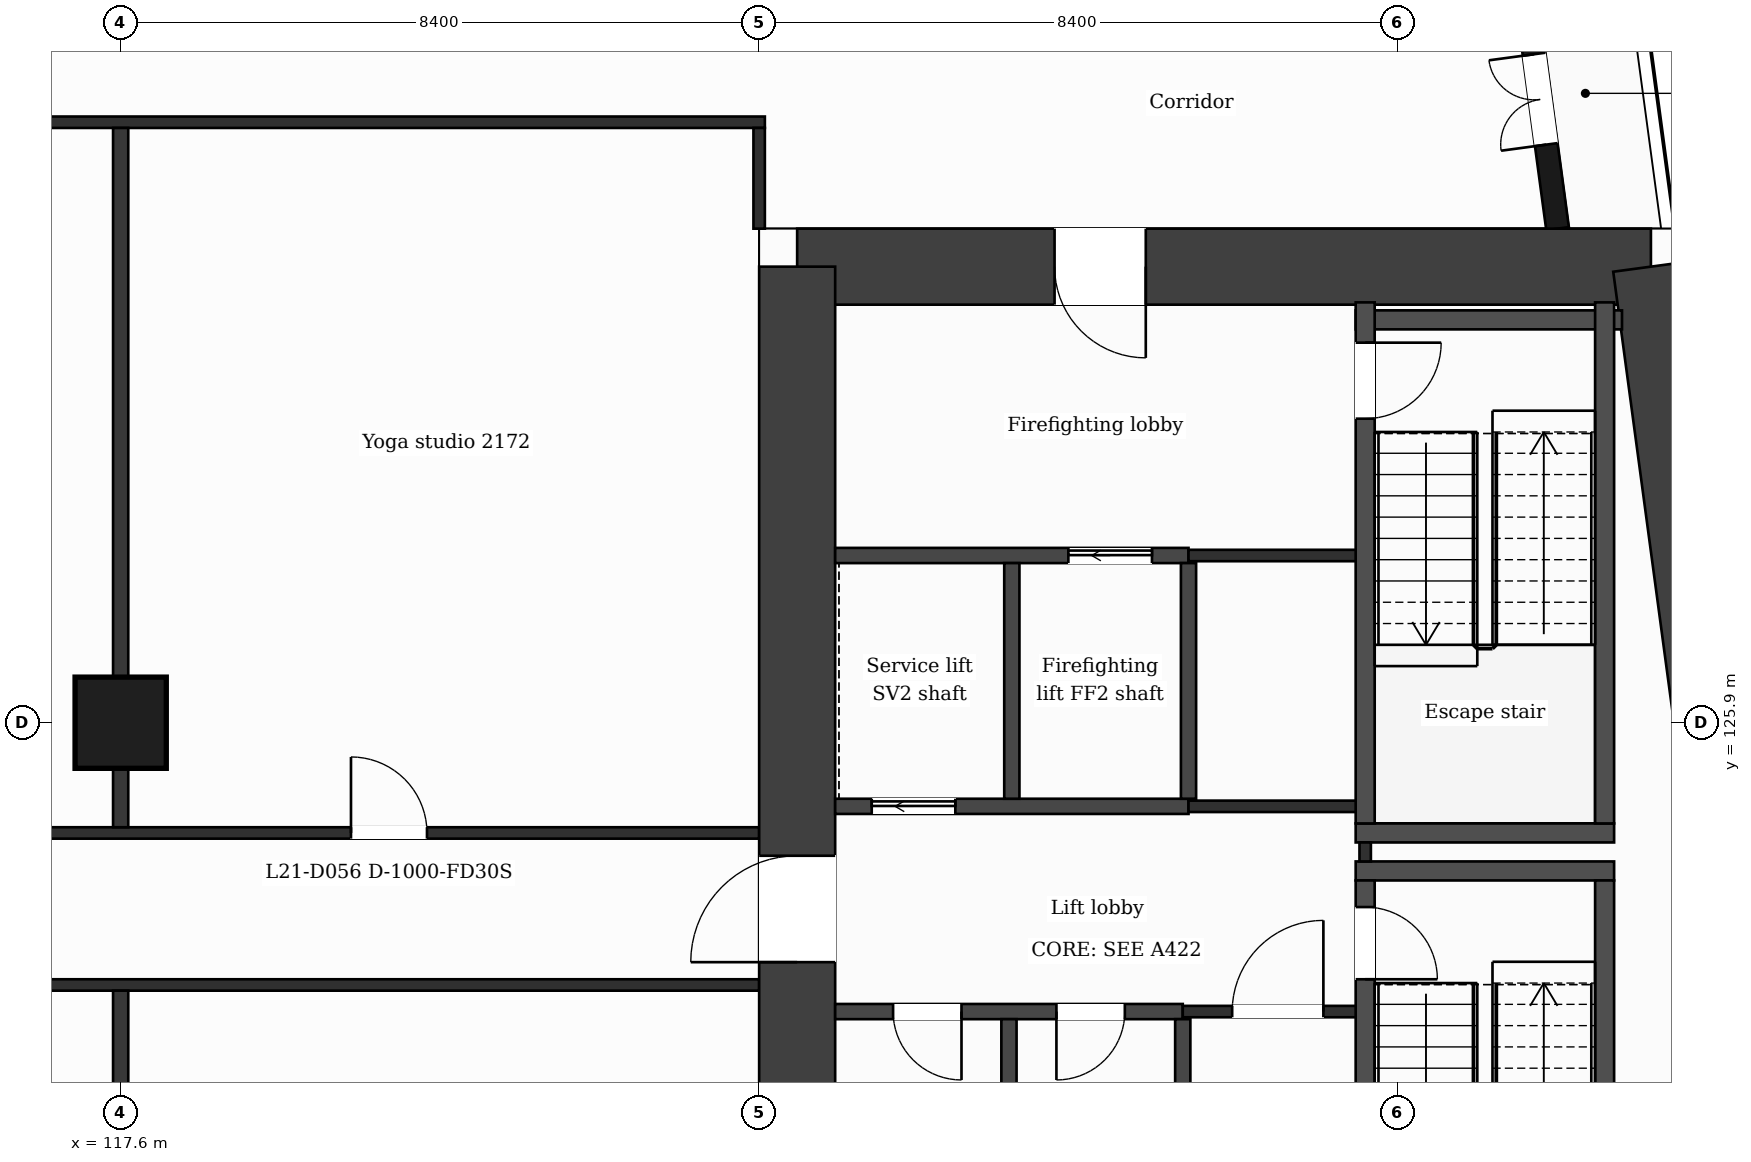
"""IFC4 building model, lengths in metres.
Left out: names, types, materials, properties, quantities, classifications, styles, units other than length and angle.
Written with IfcOpenShell. Run it as: python <this file> out.ifc"""

import sys

from ifc_helpers import new_model, si_unit, direction, frame, frame_2d, origin, origin_2d, place, context, subcontext, project, spatial, rectangle, extrude, element, fill, save


model = new_model("IFC4")
c1 = context("Model", 3, precision=1e-05, world=origin(), true_north=direction((0.0, 1.0)))
c2 = subcontext(c1, "Body", "Model", "MODEL_VIEW")
j1 = project(units=[si_unit("LENGTHUNIT", "METRE"), si_unit("PLANEANGLEUNIT", "RADIAN")], contexts=[c1])
p1 = place(None, origin())
s1 = spatial("IfcSite", under=j1, at=p1, CompositionType="ELEMENT")
p2 = place(p1, origin())
s2 = spatial("IfcBuilding", under=s1, at=p2, CompositionType="ELEMENT")
p3 = place(p2, frame((0.0, 0.0, 94.7)))
s3 = spatial("IfcBuildingStorey", under=s2, at=p3, CompositionType="ELEMENT", Elevation=94.7)
p4 = place(p3, frame((126.5, 131.9, 0.0), z_axis=(0.0, 0.0, 1.0), x_axis=(1.0, 0.0, 0.0)))
e1 = element("IfcWall", 1, at=p4, inside=s3, PredefinedType="SHEAR", context=c2, shape_type="SweptSolid", body=[
    extrude(rectangle(XDim=11.232, YDim=1.0, at=frame_2d((5.616, 0.0))), origin(), (0.0, 0.0, 1.0), 3.7),
])
p5 = place(p4, frame((3.386, 0.0, 0.0)))
e2 = element("IfcOpeningElement", 2, at=p5, cuts=e1, PredefinedType="OPENING", context=c2, shape_type="SweptSolid", body=[
    extrude(rectangle(XDim=1.2, YDim=2.1, at=frame_2d((0.6, 1.05))), frame((0.0, 0.51, 0.0), z_axis=(0.0, -1.0, 0.0), x_axis=(1.0, 0.0, 0.0)), (0.0, 0.0, 1.0), 1.02),
])
p6 = place(p3, frame((137.732, 131.9, 0.0), z_axis=(0.0, 0.0, 1.0), x_axis=(0.133411141623, -0.991060778808, 0.0)))
e3 = element("IfcWall", 3, at=p6, inside=s3, PredefinedType="SHEAR", context=c2, shape_type="SweptSolid", body=[
    extrude(rectangle(XDim=21.189, YDim=1.0, at=frame_2d((10.595, 0.0))), origin(), (0.0, 0.0, 1.0), 3.7),
])
p7 = place(p3, frame((126.5, 110.9, 0.0), z_axis=(0.0, 0.0, 1.0), x_axis=(0.0, 1.0, 0.0)))
e4 = element("IfcWall", 4, at=p7, inside=s3, PredefinedType="SHEAR", context=c2, shape_type="SweptSolid", body=[
    extrude(rectangle(XDim=21.0, YDim=1.0, at=frame_2d((10.5, 0.0))), origin(), (0.0, 0.0, 1.0), 3.7),
])
p8 = place(p7, frame((11.85, 0.0, 0.0)))
e5 = element("IfcOpeningElement", 5, at=p8, cuts=e4, PredefinedType="OPENING", context=c2, shape_type="SweptSolid", body=[
    extrude(rectangle(XDim=1.4, YDim=2.1, at=frame_2d((0.7, 1.05))), frame((0.0, 0.51, 0.0), z_axis=(0.0, -1.0, 0.0), x_axis=(1.0, 0.0, 0.0)), (0.0, 0.0, 1.0), 1.02),
])
p9 = place(p3, frame((117.6, 125.9, 0.0), z_axis=(0.0, 0.0, 1.0), x_axis=(1.0, 0.0, 0.0)))
e6 = element("IfcColumn", 6, at=p9, inside=s3, PredefinedType="COLUMN", context=c2, shape_type="SweptSolid", body=[
    extrude(rectangle(XDim=1.2, YDim=1.2, at=origin_2d()), origin(), (0.0, 0.0, 1.0), 3.7),
])
p10 = place(p3, frame((136.504, 132.4, 0.0), z_axis=(0.0, 0.0, 1.0), x_axis=(-0.133399697462, 0.99106231929, 0.0)))
e7 = element("IfcWall", 7, at=p10, inside=s3, PredefinedType="SOLIDWALL", context=c2, shape_type="SweptSolid", body=[
    extrude(rectangle(XDim=6.74, YDim=0.3, at=frame_2d((3.37, 0.0))), origin(), (0.0, 0.0, 1.0), 3.38),
])
p11 = place(p10, frame((1.115, 0.0, 0.0)))
e8 = element("IfcOpeningElement", 8, at=p11, cuts=e7, PredefinedType="OPENING", context=c2, shape_type="SweptSolid", body=[
    extrude(rectangle(XDim=1.2, YDim=2.4, at=frame_2d((0.6, 1.2))), frame((0.0, 0.16, 0.0), z_axis=(0.0, -1.0, 0.0), x_axis=(1.0, 0.0, 0.0)), (0.0, 0.0, 1.0), 0.32),
])
p12 = place(p10, frame((4.436, 0.0, 0.9)))
e9 = element("IfcOpeningElement", 9, at=p12, cuts=e7, PredefinedType="OPENING", context=c2, shape_type="SweptSolid", body=[
    extrude(rectangle(XDim=1.2, YDim=2.1, at=frame_2d((0.6, 1.05))), frame((0.0, 0.16, 0.0), z_axis=(0.0, -1.0, 0.0), x_axis=(1.0, 0.0, 0.0)), (0.0, 0.0, 1.0), 0.32),
])
p13 = place(p3, frame((127.0, 122.1, 0.0), z_axis=(0.0, 0.0, 1.0), x_axis=(1.0, 0.0, 0.0)))
e10 = element("IfcWall", 10, at=p13, inside=s3, PredefinedType="PARTITIONING", context=c2, shape_type="SweptSolid", body=[
    extrude(rectangle(XDim=4.573, YDim=0.2, at=frame_2d((2.287, 0.0))), origin(), (0.0, 0.0, 1.0), 3.38),
])
p14 = place(p13, frame((2.911, 0.0, 0.0)))
e11 = element("IfcOpeningElement", 11, at=p14, cuts=e10, PredefinedType="OPENING", context=c2, shape_type="SweptSolid", body=[
    extrude(rectangle(XDim=0.9, YDim=2.1, at=frame_2d((0.45, 1.05))), frame((0.0, 0.11, 0.0), z_axis=(0.0, -1.0, 0.0), x_axis=(1.0, 0.0, 0.0)), (0.0, 0.0, 1.0), 0.22),
])
p15 = place(p13, frame((0.762, 0.0, 0.0)))
e12 = element("IfcOpeningElement", 12, at=p15, cuts=e10, PredefinedType="OPENING", context=c2, shape_type="SweptSolid", body=[
    extrude(rectangle(XDim=0.9, YDim=2.1, at=frame_2d((0.45, 1.05))), frame((0.0, 0.11, 0.0), z_axis=(0.0, -1.0, 0.0), x_axis=(1.0, 0.0, 0.0)), (0.0, 0.0, 1.0), 0.22),
])
p16 = place(p3, frame((131.573, 122.1, 0.0), z_axis=(0.0, 0.0, 1.0), x_axis=(1.0, 0.0, 0.0)))
e13 = element("IfcWall", 13, at=p16, inside=s3, PredefinedType="PARTITIONING", context=c2, shape_type="SweptSolid", body=[
    extrude(rectangle(XDim=2.4, YDim=0.15, at=frame_2d((1.2, 0.0))), origin(), (0.0, 0.0, 1.0), 3.38),
])
p17 = place(p16, frame((0.65, 0.0, 0.0)))
e14 = element("IfcOpeningElement", 14, at=p17, cuts=e13, PredefinedType="OPENING", context=c2, shape_type="SweptSolid", body=[
    extrude(rectangle(XDim=1.2, YDim=2.1, at=frame_2d((0.6, 1.05))), frame((0.0, 0.085, 0.0), z_axis=(0.0, -1.0, 0.0), x_axis=(1.0, 0.0, 0.0)), (0.0, 0.0, 1.0), 0.17),
])
p18 = place(p3, frame((100.8, 122.45, 0.0), z_axis=(0.0, 0.0, 1.0), x_axis=(1.0, 0.0, 0.0)))
e15 = element("IfcWall", 15, at=p18, inside=s3, PredefinedType="PARTITIONING", context=c2, shape_type="SweptSolid", body=[
    extrude(rectangle(XDim=25.2, YDim=0.15, at=frame_2d((12.6, 0.0))), origin(), (0.0, 0.0, 1.0), 3.38),
])
for number, where, z_axis, x_axis in (
    (16, (133.848, 123.95, 0.0), (0.0, 0.0, 1.0), (1.0, 0.0, 0.0)),
    (17, (133.848, 124.45, 0.0), (0.0, 0.0, 1.0), (1.0, 0.0, 0.0)),
):
    element("IfcWall", number, at=place(p3, frame(where, z_axis=z_axis, x_axis=x_axis)), inside=s3, PredefinedType="PARTITIONING", context=c2, shape_type="SweptSolid", body=[
        extrude(rectangle(XDim=3.4, YDim=0.25, at=frame_2d((1.7, 0.0))), origin(), (0.0, 0.0, 1.0), 3.38),
    ])
p19 = place(p3, frame((100.8, 124.45, 0.0), z_axis=(0.0, 0.0, 1.0), x_axis=(1.0, 0.0, 0.0)))
e18 = element("IfcWall", 18, at=p19, inside=s3, PredefinedType="PARTITIONING", context=c2, shape_type="SweptSolid", body=[
    extrude(rectangle(XDim=25.2, YDim=0.15, at=frame_2d((12.6, 0.0))), origin(), (0.0, 0.0, 1.0), 3.38),
])
p20 = place(p19, frame((4.275, 0.0, 0.0)))
e19 = element("IfcOpeningElement", 19, at=p20, cuts=e18, PredefinedType="OPENING", context=c2, shape_type="SweptSolid", body=[
    extrude(rectangle(XDim=1.0, YDim=2.1, at=frame_2d((0.5, 1.05))), frame((0.0, 0.085, 0.0), z_axis=(0.0, -1.0, 0.0), x_axis=(1.0, 0.0, 0.0)), (0.0, 0.0, 1.0), 0.17),
])
p21 = place(p19, frame((1.0, 0.0, 0.0)))
e20 = element("IfcOpeningElement", 20, at=p21, cuts=e18, PredefinedType="OPENING", context=c2, shape_type="SweptSolid", body=[
    extrude(rectangle(XDim=1.0, YDim=2.1, at=frame_2d((0.5, 1.05))), frame((0.0, 0.085, 0.0), z_axis=(0.0, -1.0, 0.0), x_axis=(1.0, 0.0, 0.0)), (0.0, 0.0, 1.0), 0.17),
])
p22 = place(p19, frame((12.1, 0.0, 0.0)))
e21 = element("IfcOpeningElement", 21, at=p22, cuts=e18, PredefinedType="OPENING", context=c2, shape_type="SweptSolid", body=[
    extrude(rectangle(XDim=1.0, YDim=2.1, at=frame_2d((0.5, 1.05))), frame((0.0, 0.085, 0.0), z_axis=(0.0, -1.0, 0.0), x_axis=(1.0, 0.0, 0.0)), (0.0, 0.0, 1.0), 0.17),
])
p23 = place(p19, frame((19.83, 0.0, 0.0)))
e22 = element("IfcOpeningElement", 22, at=p23, cuts=e18, PredefinedType="OPENING", context=c2, shape_type="SweptSolid", body=[
    extrude(rectangle(XDim=1.0, YDim=2.1, at=frame_2d((0.5, 1.05))), frame((0.0, 0.085, 0.0), z_axis=(0.0, -1.0, 0.0), x_axis=(1.0, 0.0, 0.0)), (0.0, 0.0, 1.0), 0.17),
])
p24 = place(p3, frame((127.0, 124.8, 0.0), z_axis=(0.0, 0.0, 1.0), x_axis=(1.0, 0.0, 0.0)))
e23 = element("IfcWall", 23, at=p24, inside=s3, PredefinedType="PARTITIONING", context=c2, shape_type="SweptSolid", body=[
    extrude(rectangle(XDim=4.649, YDim=0.2, at=frame_2d((2.324, 0.0))), origin(), (0.0, 0.0, 1.0), 3.38),
])
p25 = place(p24, frame((0.481, 0.0, 0.0)))
e24 = element("IfcOpeningElement", 24, at=p25, cuts=e23, PredefinedType="OPENING", context=c2, shape_type="SweptSolid", body=[
    extrude(rectangle(XDim=1.1, YDim=2.1, at=frame_2d((0.55, 1.05))), frame((0.0, 0.11, 0.0), z_axis=(0.0, -1.0, 0.0), x_axis=(1.0, 0.0, 0.0)), (0.0, 0.0, 1.0), 0.22),
])
p26 = place(p3, frame((131.649, 124.8, 0.0), z_axis=(0.0, 0.0, 1.0), x_axis=(1.0, 0.0, 0.0)))
e25 = element("IfcWall", 25, at=p26, inside=s3, PredefinedType="PARTITIONING", context=c2, shape_type="SweptSolid", body=[
    extrude(rectangle(XDim=2.449, YDim=0.15, at=frame_2d((1.225, 0.0))), origin(), (0.0, 0.0, 1.0), 3.38),
])
p27 = place(p3, frame((127.0, 128.1, 0.0), z_axis=(0.0, 0.0, 1.0), x_axis=(1.0, 0.0, 0.0)))
e26 = element("IfcWall", 26, at=p27, inside=s3, PredefinedType="PARTITIONING", context=c2, shape_type="SweptSolid", body=[
    extrude(rectangle(XDim=4.649, YDim=0.2, at=frame_2d((2.324, 0.0))), origin(), (0.0, 0.0, 1.0), 3.38),
])
p28 = place(p27, frame((3.068, 0.0, 0.0)))
e27 = element("IfcOpeningElement", 27, at=p28, cuts=e26, PredefinedType="OPENING", context=c2, shape_type="SweptSolid", body=[
    extrude(rectangle(XDim=1.1, YDim=2.1, at=frame_2d((0.55, 1.05))), frame((0.0, 0.11, 0.0), z_axis=(0.0, -1.0, 0.0), x_axis=(1.0, 0.0, 0.0)), (0.0, 0.0, 1.0), 0.22),
])
p29 = place(p3, frame((131.649, 128.1, 0.0), z_axis=(0.0, 0.0, 1.0), x_axis=(1.0, 0.0, 0.0)))
e28 = element("IfcWall", 28, at=p29, inside=s3, PredefinedType="PARTITIONING", context=c2, shape_type="SweptSolid", body=[
    extrude(rectangle(XDim=2.324, YDim=0.15, at=frame_2d((1.162, 0.0))), origin(), (0.0, 0.0, 1.0), 3.38),
])
p30 = place(p3, frame((133.848, 131.2, 0.0), z_axis=(0.0, 0.0, 1.0), x_axis=(1.0, 0.0, 0.0)))
e29 = element("IfcWall", 29, at=p30, inside=s3, PredefinedType="PARTITIONING", context=c2, shape_type="SweptSolid", body=[
    extrude(rectangle(XDim=3.504, YDim=0.25, at=frame_2d((1.752, 0.0))), origin(), (0.0, 0.0, 1.0), 3.38),
])
p31 = place(p3, frame((100.725, 133.8, 0.0), z_axis=(0.0, 0.0, 1.0), x_axis=(1.0, 0.0, 0.0)))
e30 = element("IfcWall", 30, at=p31, inside=s3, PredefinedType="PARTITIONING", context=c2, shape_type="SweptSolid", body=[
    extrude(rectangle(XDim=25.35, YDim=0.15, at=frame_2d((12.675, 0.0))), origin(), (0.0, 0.0, 1.0), 3.38),
])
p32 = place(p3, frame((117.6, 109.075, 0.0), z_axis=(0.0, 0.0, 1.0), x_axis=(0.0, 1.0, 0.0)))
e31 = element("IfcWall", 31, at=p32, inside=s3, PredefinedType="PARTITIONING", context=c2, shape_type="SweptSolid", body=[
    extrude(rectangle(XDim=13.3, YDim=0.2, at=frame_2d((6.65, 0.0))), origin(), (0.0, 0.0, 1.0), 3.38),
])
p33 = place(p3, frame((117.6, 124.525, 0.0), z_axis=(0.0, 0.0, 1.0), x_axis=(0.0, 1.0, 0.0)))
e32 = element("IfcWall", 32, at=p33, inside=s3, PredefinedType="PARTITIONING", context=c2, shape_type="SweptSolid", body=[
    extrude(rectangle(XDim=9.2, YDim=0.2, at=frame_2d((4.6, 0.0))), origin(), (0.0, 0.0, 1.0), 3.38),
])
p34 = place(p3, frame((126.0, 132.4, 0.0), z_axis=(0.0, 0.0, 1.0), x_axis=(0.0, 1.0, 0.0)))
e33 = element("IfcWall", 33, at=p34, inside=s3, PredefinedType="PARTITIONING", context=c2, shape_type="SweptSolid", body=[
    extrude(rectangle(XDim=1.325, YDim=0.15, at=frame_2d((0.663, 0.0))), origin(), (0.0, 0.0, 1.0), 3.38),
])
for number, where, z_axis, x_axis in (
    (34, (129.287, 118.9, 0.0), (0.0, 0.0, 1.0), (0.0, 1.0, 0.0)),
    (35, (129.324, 124.9, 0.0), (0.0, 0.0, 1.0), (0.0, 1.0, 0.0)),
):
    element("IfcWall", number, at=place(p3, frame(where, z_axis=z_axis, x_axis=x_axis)), inside=s3, PredefinedType="PARTITIONING", context=c2, shape_type="SweptSolid", body=[
        extrude(rectangle(XDim=3.1, YDim=0.2, at=frame_2d((1.55, 0.0))), origin(), (0.0, 0.0, 1.0), 3.38),
    ])
p35 = place(p3, frame((131.573, 116.97, 0.0), z_axis=(0.0, 0.0, 1.0), x_axis=(0.0, 1.0, 0.0)))
e36 = element("IfcWall", 36, at=p35, inside=s3, PredefinedType="PARTITIONING", context=c2, shape_type="SweptSolid", body=[
    extrude(rectangle(XDim=5.03, YDim=0.2, at=frame_2d((2.515, 0.0))), origin(), (0.0, 0.0, 1.0), 3.38),
])
p36 = place(p35, frame((0.58, 0.0, 0.0)))
e37 = element("IfcOpeningElement", 37, at=p36, cuts=e36, PredefinedType="OPENING", context=c2, shape_type="SweptSolid", body=[
    extrude(rectangle(XDim=0.9, YDim=2.1, at=frame_2d((0.45, 1.05))), frame((0.0, 0.11, 0.0), z_axis=(0.0, -1.0, 0.0), x_axis=(1.0, 0.0, 0.0)), (0.0, 0.0, 1.0), 0.22),
])
p37 = place(p3, frame((131.649, 124.9, 0.0), z_axis=(0.0, 0.0, 1.0), x_axis=(0.0, 1.0, 0.0)))
e38 = element("IfcWall", 38, at=p37, inside=s3, PredefinedType="PARTITIONING", context=c2, shape_type="SweptSolid", body=[
    extrude(rectangle(XDim=3.1, YDim=0.2, at=frame_2d((1.55, 0.0))), origin(), (0.0, 0.0, 1.0), 3.38),
])
p38 = place(p3, frame((133.973, 124.075, 0.0), z_axis=(0.0, 0.0, 1.0), x_axis=(0.0, 1.0, 0.0)))
e39 = element("IfcWall", 39, at=p38, inside=s3, PredefinedType="PARTITIONING", context=c2, shape_type="SweptSolid", body=[
    extrude(rectangle(XDim=0.25, YDim=0.15, at=frame_2d((0.125, 0.0))), origin(), (0.0, 0.0, 1.0), 3.38),
])
p39 = place(p3, frame((133.973, 116.97, 0.0), z_axis=(0.0, 0.0, 1.0), x_axis=(0.0, 1.0, 0.0)))
e40 = element("IfcWall", 40, at=p39, inside=s3, PredefinedType="PARTITIONING", context=c2, shape_type="SweptSolid", body=[
    extrude(rectangle(XDim=6.855, YDim=0.25, at=frame_2d((3.427, 0.0))), origin(), (0.0, 0.0, 1.0), 3.38),
])
p40 = place(p39, frame((5.555, 0.0, 0.0)))
e41 = element("IfcOpeningElement", 41, at=p40, cuts=e40, PredefinedType="OPENING", context=c2, shape_type="SweptSolid", body=[
    extrude(rectangle(XDim=0.95, YDim=2.1, at=frame_2d((0.475, 1.05))), frame((0.0, 0.135, 0.0), z_axis=(0.0, -1.0, 0.0), x_axis=(1.0, 0.0, 0.0)), (0.0, 0.0, 1.0), 0.27),
])
p41 = place(p3, frame((133.973, 124.575, 0.0), z_axis=(0.0, 0.0, 1.0), x_axis=(0.0, 1.0, 0.0)))
e42 = element("IfcWall", 42, at=p41, inside=s3, PredefinedType="PARTITIONING", context=c2, shape_type="SweptSolid", body=[
    extrude(rectangle(XDim=6.855, YDim=0.25, at=frame_2d((3.427, 0.0))), origin(), (0.0, 0.0, 1.0), 3.38),
])
p42 = place(p41, frame((5.325, 0.0, 0.0)))
e43 = element("IfcOpeningElement", 43, at=p42, cuts=e42, PredefinedType="OPENING", context=c2, shape_type="SweptSolid", body=[
    extrude(rectangle(XDim=1.0, YDim=2.1, at=frame_2d((0.5, 1.05))), frame((0.0, 0.135, 0.0), z_axis=(0.0, -1.0, 0.0), x_axis=(1.0, 0.0, 0.0)), (0.0, 0.0, 1.0), 0.27),
])
for number, where, z_axis, x_axis in (
    (44, (137.123, 116.97, 0.0), (0.0, 0.0, 1.0), (0.0, 1.0, 0.0)),
    (45, (137.123, 124.575, 0.0), (0.0, 0.0, 1.0), (0.0, 1.0, 0.0)),
):
    element("IfcWall", number, at=place(p3, frame(where, z_axis=z_axis, x_axis=x_axis)), inside=s3, PredefinedType="PARTITIONING", context=c2, shape_type="SweptSolid", body=[
        extrude(rectangle(XDim=6.855, YDim=0.25, at=frame_2d((3.427, 0.0))), origin(), (0.0, 0.0, 1.0), 3.38),
    ])
p43 = place(p11, origin())
e46 = element("IfcDoor", 46, at=p43, inside=s3, OperationType="DOUBLE_DOOR_SINGLE_SWING", PredefinedType="DOOR", context=c2, shape_type="SweptSolid", body=[
    extrude(rectangle(XDim=1.2, YDim=2.4, at=frame_2d((0.6, 1.2))), frame((0.0, 0.025, 0.0), z_axis=(0.0, -1.0, 0.0), x_axis=(1.0, 0.0, 0.0)), (0.0, 0.0, 1.0), 0.05),
])
fill(e8, e46)
p44 = place(p17, origin())
e47 = element("IfcDoor", 47, at=p44, inside=s3, OperationType="SINGLE_SWING_RIGHT", PredefinedType="DOOR", context=c2, shape_type="SweptSolid", body=[
    extrude(rectangle(XDim=1.2, YDim=2.1, at=frame_2d((0.6, 1.05))), frame((0.0, 0.025, 0.0), z_axis=(0.0, -1.0, 0.0), x_axis=(1.0, 0.0, 0.0)), (0.0, 0.0, 1.0), 0.05),
])
fill(e14, e47)
p45 = place(p28, origin())
e48 = element("IfcDoor", 48, at=p45, inside=s3, OperationType="SLIDING_TO_LEFT", PredefinedType="DOOR", context=c2, shape_type="SweptSolid", body=[
    extrude(rectangle(XDim=1.1, YDim=2.1, at=frame_2d((0.55, 1.05))), frame((0.0, 0.025, 0.0), z_axis=(0.0, -1.0, 0.0), x_axis=(1.0, 0.0, 0.0)), (0.0, 0.0, 1.0), 0.05),
])
fill(e27, e48)
p46 = place(p25, origin())
e49 = element("IfcDoor", 49, at=p46, inside=s3, OperationType="SLIDING_TO_LEFT", PredefinedType="DOOR", context=c2, shape_type="SweptSolid", body=[
    extrude(rectangle(XDim=1.1, YDim=2.1, at=frame_2d((0.55, 1.05))), frame((0.0, 0.025, 0.0), z_axis=(0.0, -1.0, 0.0), x_axis=(1.0, 0.0, 0.0)), (0.0, 0.0, 1.0), 0.05),
])
fill(e24, e49)
p47 = place(p14, origin())
e50 = element("IfcDoor", 50, at=p47, inside=s3, OperationType="SINGLE_SWING_LEFT", PredefinedType="DOOR", context=c2, shape_type="SweptSolid", body=[
    extrude(rectangle(XDim=0.9, YDim=2.1, at=frame_2d((0.45, 1.05))), frame((0.0, 0.025, 0.0), z_axis=(0.0, -1.0, 0.0), x_axis=(1.0, 0.0, 0.0)), (0.0, 0.0, 1.0), 0.05),
])
fill(e11, e50)
p48 = place(p15, origin())
e51 = element("IfcDoor", 51, at=p48, inside=s3, OperationType="SINGLE_SWING_RIGHT", PredefinedType="DOOR", context=c2, shape_type="SweptSolid", body=[
    extrude(rectangle(XDim=0.9, YDim=2.1, at=frame_2d((0.45, 1.05))), frame((0.0, 0.025, 0.0), z_axis=(0.0, -1.0, 0.0), x_axis=(1.0, 0.0, 0.0)), (0.0, 0.0, 1.0), 0.05),
])
fill(e12, e51)
p49 = place(p40, origin())
e52 = element("IfcDoor", 52, at=p49, inside=s3, OperationType="SINGLE_SWING_LEFT", PredefinedType="DOOR", context=c2, shape_type="SweptSolid", body=[
    extrude(rectangle(XDim=0.95, YDim=2.1, at=frame_2d((0.475, 1.05))), frame((0.0, 0.025, 0.0), z_axis=(0.0, -1.0, 0.0), x_axis=(1.0, 0.0, 0.0)), (0.0, 0.0, 1.0), 0.05),
])
fill(e41, e52)
p50 = place(p42, origin())
e53 = element("IfcDoor", 53, at=p50, inside=s3, OperationType="SINGLE_SWING_RIGHT", PredefinedType="DOOR", context=c2, shape_type="SweptSolid", body=[
    extrude(rectangle(XDim=1.0, YDim=2.1, at=frame_2d((0.5, 1.05))), frame((0.0, 0.025, 0.0), z_axis=(0.0, -1.0, 0.0), x_axis=(1.0, 0.0, 0.0)), (0.0, 0.0, 1.0), 0.05),
])
fill(e43, e53)
p51 = place(p23, origin())
e54 = element("IfcDoor", 54, at=p51, inside=s3, OperationType="SINGLE_SWING_LEFT", PredefinedType="DOOR", context=c2, shape_type="SweptSolid", body=[
    extrude(rectangle(XDim=1.0, YDim=2.1, at=frame_2d((0.5, 1.05))), frame((0.0, 0.025, 0.0), z_axis=(0.0, -1.0, 0.0), x_axis=(1.0, 0.0, 0.0)), (0.0, 0.0, 1.0), 0.05),
])
fill(e22, e54)
p52 = place(p5, origin())
e55 = element("IfcDoor", 55, at=p52, inside=s3, OperationType="SINGLE_SWING_RIGHT", PredefinedType="DOOR", context=c2, shape_type="SweptSolid", body=[
    extrude(rectangle(XDim=1.2, YDim=2.1, at=frame_2d((0.6, 1.05))), frame((0.0, 0.025, 0.0), z_axis=(0.0, -1.0, 0.0), x_axis=(1.0, 0.0, 0.0)), (0.0, 0.0, 1.0), 0.05),
])
fill(e2, e55)
p53 = place(p8, origin())
e56 = element("IfcDoor", 56, at=p53, inside=s3, OperationType="SINGLE_SWING_LEFT", PredefinedType="DOOR", context=c2, shape_type="SweptSolid", body=[
    extrude(rectangle(XDim=1.4, YDim=2.1, at=frame_2d((0.7, 1.05))), frame((0.0, 0.025, 0.0), z_axis=(0.0, -1.0, 0.0), x_axis=(1.0, 0.0, 0.0)), (0.0, 0.0, 1.0), 0.05),
])
fill(e5, e56)
save(model, sys.argv[1])
